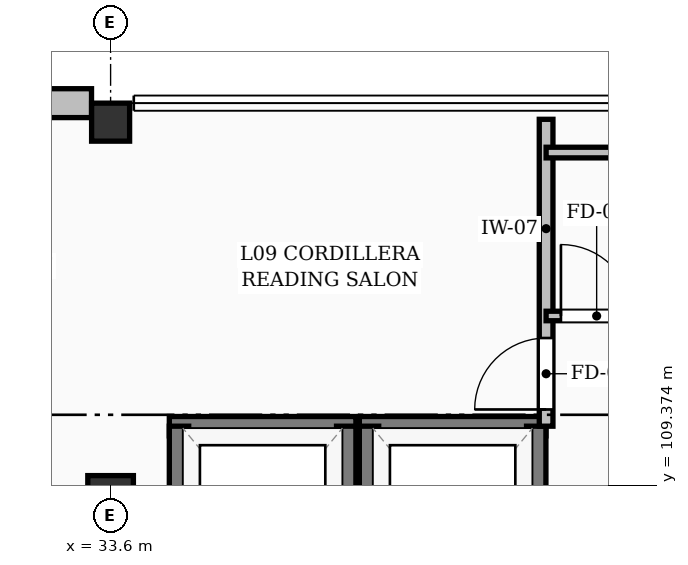
"""IFC4 building model, lengths in metres.
Left out: names, types, materials, properties, quantities, classifications, styles, units other than length and angle.
Written with IfcOpenShell. Run it as: python <this file> out.ifc"""

import sys

from ifc_helpers import new_model, si_unit, direction, frame, frame_2d, origin, origin_2d, place, context, subcontext, project, spatial, rectangle, extrude, element, fill, save


model = new_model("IFC4")
c1 = context("Model", 3, precision=1e-05, world=origin(), true_north=direction((0.0, 1.0)))
c2 = subcontext(c1, "Body", "Model", "MODEL_VIEW")
j1 = project(units=[si_unit("LENGTHUNIT", "METRE"), si_unit("PLANEANGLEUNIT", "RADIAN")], contexts=[c1])
p1 = place(None, origin())
s1 = spatial("IfcSite", under=j1, at=p1, CompositionType="ELEMENT")
p2 = place(p1, origin())
s2 = spatial("IfcBuilding", under=s1, at=p2, CompositionType="ELEMENT")
p3 = place(p2, frame((0.0, 0.0, 31.92)))
s3 = spatial("IfcBuildingStorey", under=s2, at=p3, CompositionType="ELEMENT", Elevation=31.92)
p4 = place(p3, frame((33.6, 109.2, 0.0), z_axis=(0.0, 0.0, 1.0), x_axis=(1.0, 0.0, 0.0)))
e1 = element("IfcColumn", 1, at=p4, inside=s3, PredefinedType="COLUMN", context=c2, shape_type="SweptSolid", body=[
    extrude(rectangle(XDim=0.6, YDim=0.6, at=origin_2d()), origin(), (0.0, 0.0, 1.0), 3.36),
])
p5 = place(p3, frame((33.6, 114.15, 0.0), z_axis=(0.0, 0.0, 1.0), x_axis=(1.0, 0.0, 0.0)))
e2 = element("IfcColumn", 2, at=p5, inside=s3, PredefinedType="COLUMN", context=c2, shape_type="SweptSolid", body=[
    extrude(rectangle(XDim=0.5, YDim=0.5, at=origin_2d()), origin(), (0.0, 0.0, 1.0), 3.36),
])
p6 = place(p3, frame((25.451, 114.4, 0.0), z_axis=(0.0, 0.0, 1.0), x_axis=(1.0, 0.0, 0.0)))
e3 = element("IfcWall", 3, at=p6, inside=s3, PredefinedType="SOLIDWALL", context=c2, shape_type="SweptSolid", body=[
    extrude(rectangle(XDim=7.898, YDim=0.38, at=frame_2d((3.949, 0.0))), origin(), (0.0, 0.0, 1.0), 2.474),
])
p7 = place(p6, frame((1.024, 0.0, 0.0)))
e4 = element("IfcOpeningElement", 4, at=p7, cuts=e3, PredefinedType="OPENING", context=c2, shape_type="SweptSolid", body=[
    extrude(rectangle(XDim=1.75, YDim=2.08, at=frame_2d((0.875, 1.04))), frame((0.0, 0.2, 0.0), z_axis=(0.0, -1.0, 0.0), x_axis=(1.0, 0.0, 0.0)), (0.0, 0.0, 1.0), 0.4),
])
p8 = place(p6, frame((4.774, 0.0, 0.25)))
e5 = element("IfcOpeningElement", 5, at=p8, cuts=e3, PredefinedType="OPENING", context=c2, shape_type="SweptSolid", body=[
    extrude(rectangle(XDim=2.25, YDim=1.85, at=frame_2d((1.125, 0.925))), frame((0.0, 0.2, 0.0), z_axis=(0.0, -1.0, 0.0), x_axis=(1.0, 0.0, 0.0)), (0.0, 0.0, 1.0), 0.4),
])
p9 = place(p3, frame((34.373, 110.15, 0.0), z_axis=(0.0, 0.0, 1.0), x_axis=(1.0, 0.0, 0.0)))
e6 = element("IfcWall", 6, at=p9, inside=s3, PredefinedType="SOLIDWALL", context=c2, shape_type="SweptSolid", body=[
    extrude(rectangle(XDim=2.455, YDim=0.255, at=frame_2d((1.228, 0.0))), origin(), (0.0, 0.0, 1.0), 3.1),
])
for number, where, z_axis, x_axis in (
    (7, (34.5, 107.55, 0.0), (0.0, 0.0, 1.0), (0.0, 1.0, 0.0)),
    (8, (36.7, 107.55, 0.0), (0.0, 0.0, 1.0), (0.0, 1.0, 0.0)),
):
    element("IfcWall", number, at=place(p3, frame(where, z_axis=z_axis, x_axis=x_axis)), inside=s3, PredefinedType="SOLIDWALL", context=c2, shape_type="SweptSolid", body=[
        extrude(rectangle(XDim=2.6, YDim=0.255, at=frame_2d((1.3, 0.0))), origin(), (0.0, 0.0, 1.0), 3.1),
    ])
p10 = place(p3, frame((36.873, 110.15, 0.0), z_axis=(0.0, 0.0, 1.0), x_axis=(1.0, 0.0, 0.0)))
e9 = element("IfcWall", 9, at=p10, inside=s3, PredefinedType="SOLIDWALL", context=c2, shape_type="SweptSolid", body=[
    extrude(rectangle(XDim=2.455, YDim=0.255, at=frame_2d((1.228, 0.0))), origin(), (0.0, 0.0, 1.0), 3.1),
])
for number, where, z_axis, x_axis in (
    (10, (37.0, 107.55, 0.0), (0.0, 0.0, 1.0), (0.0, 1.0, 0.0)),
    (11, (39.2, 107.55, 0.0), (0.0, 0.0, 1.0), (0.0, 1.0, 0.0)),
):
    element("IfcWall", number, at=place(p3, frame(where, z_axis=z_axis, x_axis=x_axis)), inside=s3, PredefinedType="SOLIDWALL", context=c2, shape_type="SweptSolid", body=[
        extrude(rectangle(XDim=2.6, YDim=0.255, at=frame_2d((1.3, 0.0))), origin(), (0.0, 0.0, 1.0), 3.1),
    ])
p11 = place(p3, frame((39.33, 110.15, 0.0), z_axis=(0.0, 0.0, 1.0), x_axis=(0.0, 1.0, 0.0)))
e12 = element("IfcWall", 12, at=p11, inside=s3, PredefinedType="PARTITIONING", context=c2, shape_type="SweptSolid", body=[
    extrude(rectangle(XDim=4.038, YDim=0.18, at=frame_2d((2.019, 0.0))), origin(), (0.0, 0.0, 1.0), 3.1),
])
p12 = place(p11, frame((0.22, 0.0, 0.0)))
e13 = element("IfcOpeningElement", 13, at=p12, cuts=e12, PredefinedType="OPENING", context=c2, shape_type="SweptSolid", body=[
    extrude(rectangle(XDim=0.94, YDim=2.1, at=frame_2d((0.47, 1.05))), frame((0.0, 0.1, 0.0), z_axis=(0.0, -1.0, 0.0), x_axis=(1.0, 0.0, 0.0)), (0.0, 0.0, 1.0), 0.2),
])
p13 = place(p3, frame((39.33, 111.6, 0.0), z_axis=(0.0, 0.0, 1.0), x_axis=(1.0, 0.0, 0.0)))
e14 = element("IfcWall", 14, at=p13, inside=s3, PredefinedType="PARTITIONING", context=c2, shape_type="SweptSolid", body=[
    extrude(rectangle(XDim=1.33, YDim=0.125, at=frame_2d((0.665, 0.0))), origin(), (0.0, 0.0, 1.0), 3.1),
])
p14 = place(p13, frame((0.195, 0.0, 0.0)))
e15 = element("IfcOpeningElement", 15, at=p14, cuts=e14, PredefinedType="OPENING", context=c2, shape_type="SweptSolid", body=[
    extrude(rectangle(XDim=0.94, YDim=2.1, at=frame_2d((0.47, 1.05))), frame((0.0, 0.073, 0.0), z_axis=(0.0, -1.0, 0.0), x_axis=(1.0, 0.0, 0.0)), (0.0, 0.0, 1.0), 0.145),
])
p15 = place(p3, frame((39.33, 113.75, 0.0), z_axis=(0.0, 0.0, 1.0), x_axis=(1.0, 0.0, 0.0)))
e16 = element("IfcWall", 16, at=p15, inside=s3, PredefinedType="PARTITIONING", context=c2, shape_type="SweptSolid", body=[
    extrude(rectangle(XDim=2.67, YDim=0.14, at=frame_2d((1.335, 0.0))), origin(), (0.0, 0.0, 1.0), 3.1),
])
p16 = place(p12, origin())
e17 = element("IfcDoor", 17, at=p16, inside=s3, OperationType="SINGLE_SWING_LEFT", PredefinedType="DOOR", context=c2, shape_type="SweptSolid", body=[
    extrude(rectangle(XDim=0.94, YDim=2.1, at=frame_2d((0.47, 1.05))), frame((0.0, 0.025, 0.0), z_axis=(0.0, -1.0, 0.0), x_axis=(1.0, 0.0, 0.0)), (0.0, 0.0, 1.0), 0.05),
])
fill(e13, e17)
p17 = place(p14, origin())
e18 = element("IfcDoor", 18, at=p17, inside=s3, OperationType="SINGLE_SWING_LEFT", PredefinedType="DOOR", context=c2, shape_type="SweptSolid", body=[
    extrude(rectangle(XDim=0.94, YDim=2.1, at=frame_2d((0.47, 1.05))), frame((0.0, 0.025, 0.0), z_axis=(0.0, -1.0, 0.0), x_axis=(1.0, 0.0, 0.0)), (0.0, 0.0, 1.0), 0.05),
])
fill(e15, e18)
save(model, sys.argv[1])
